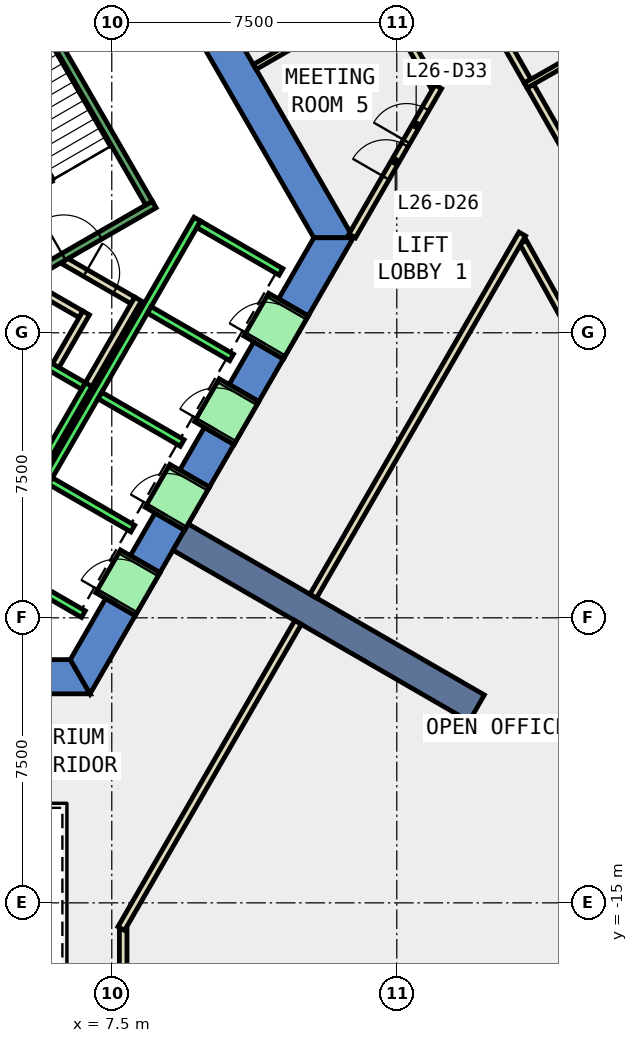
"""IFC4 building model, lengths in metres.
Left out: names, types, materials, properties, quantities, classifications, styles, units other than length and angle.
Written with IfcOpenShell. Run it as: python <this file> out.ifc"""

import sys

from ifc_helpers import new_model, si_unit, direction, frame, frame_2d, origin, place, context, subcontext, project, spatial, polyline, rectangle, outline, extrude, element, fill, save


model = new_model("IFC4")
c1 = context("Model", 3, precision=1e-05, world=origin(), true_north=direction((0.0, 1.0)))
c2 = subcontext(c1, "Body", "Model", "MODEL_VIEW")
j1 = project(units=[si_unit("LENGTHUNIT", "METRE"), si_unit("PLANEANGLEUNIT", "RADIAN")], contexts=[c1])
p1 = place(None, origin())
s1 = spatial("IfcSite", under=j1, at=p1, CompositionType="ELEMENT")
p2 = place(p1, origin())
s2 = spatial("IfcBuilding", under=s1, at=p2, CompositionType="ELEMENT")
p3 = place(p2, frame((0.0, 0.0, 120.2)))
s3 = spatial("IfcBuildingStorey", under=s2, at=p3, CompositionType="ELEMENT", Elevation=120.2)
p4 = place(p3, frame((0.0, 0.0, -0.4)))
e1 = element("IfcWall", 1, at=p4, inside=s3, PredefinedType="SHEAR", context=c2, shape_type="SweptSolid", body=[
    extrude(outline(polyline([(8.517, 11.748), (7.738, 11.298), (12.817, 2.5), (13.856, 2.5), (8.517, 11.748)])), origin(), (0.0, 0.0, 1.0), 4.2),
])
p5 = place(p3, frame((0.0, 0.0, -0.4)))
e2 = element("IfcWall", 2, at=p5, inside=s3, PredefinedType="SHEAR", context=c2, shape_type="SweptSolid", body=[
    extrude(outline(polyline([(5.75, -8.6), (5.75, -9.5), (6.928, -9.5), (6.409, -8.6), (5.75, -8.6)])), origin(), (0.0, 0.0, 1.0), 4.2),
])
p6 = place(p3, frame((0.0, 0.0, -0.4)))
e3 = element("IfcWall", 3, at=p6, inside=s3, PredefinedType="SHEAR", context=c2, shape_type="SweptSolid", body=[
    extrude(outline(polyline([(8.117, -7.44), (7.338, -6.99), (6.409, -8.6), (6.928, -9.5), (8.117, -7.44)])), origin(), (0.0, 0.0, 1.0), 4.2),
])
p7 = place(p3, frame((0.0, 0.0, -0.4)))
e4 = element("IfcWall", 4, at=p7, inside=s3, PredefinedType="SHEAR", context=c2, shape_type="SweptSolid", body=[
    extrude(outline(polyline([(9.417, -5.189), (8.638, -4.739), (7.988, -5.864), (8.767, -6.314), (9.417, -5.189)])), origin(), (0.0, 0.0, 1.0), 4.2),
])
p8 = place(p3, frame((0.0, 0.0, -0.4)))
e5 = element("IfcWall", 5, at=p8, inside=s3, PredefinedType="SHEAR", context=c2, shape_type="SweptSolid", body=[
    extrude(outline(polyline([(10.717, -2.937), (9.938, -2.487), (9.288, -3.613), (10.067, -4.063), (10.717, -2.937)])), origin(), (0.0, 0.0, 1.0), 4.2),
])
p9 = place(p3, frame((0.0, 0.0, -0.4)))
e6 = element("IfcWall", 6, at=p9, inside=s3, PredefinedType="SHEAR", context=c2, shape_type="SweptSolid", body=[
    extrude(outline(polyline([(12.017, -0.686), (11.238, -0.236), (10.588, -1.361), (11.367, -1.811), (12.017, -0.686)])), origin(), (0.0, 0.0, 1.0), 4.2),
])
p10 = place(p3, frame((0.0, 0.0, -0.4)))
e7 = element("IfcWall", 7, at=p10, inside=s3, PredefinedType="SHEAR", context=c2, shape_type="SweptSolid", body=[
    extrude(outline(polyline([(11.888, 0.89), (12.667, 0.44), (13.856, 2.5), (12.817, 2.5), (11.888, 0.89)])), origin(), (0.0, 0.0, 1.0), 4.2),
])
p11 = place(p3, frame((0.0, 0.0, 3.6)))
e8 = element("IfcWall", 8, at=p11, inside=s3, PredefinedType="SHEAR", context=c2, shape_type="SweptSolid", body=[
    extrude(outline(polyline([(8.767, -6.314), (7.988, -5.864), (7.338, -6.99), (8.117, -7.44), (8.767, -6.314)])), origin(), (0.0, 0.0, 1.0), 0.2),
])
p12 = place(p3, frame((0.0, 0.0, 3.6)))
e9 = element("IfcWall", 9, at=p12, inside=s3, PredefinedType="SHEAR", context=c2, shape_type="SweptSolid", body=[
    extrude(outline(polyline([(10.067, -4.063), (9.288, -3.613), (8.638, -4.739), (9.417, -5.189), (10.067, -4.063)])), origin(), (0.0, 0.0, 1.0), 0.2),
])
p13 = place(p3, frame((0.0, 0.0, 3.6)))
e10 = element("IfcWall", 10, at=p13, inside=s3, PredefinedType="SHEAR", context=c2, shape_type="SweptSolid", body=[
    extrude(outline(polyline([(11.367, -1.811), (10.588, -1.361), (9.938, -2.487), (10.717, -2.937), (11.367, -1.811)])), origin(), (0.0, 0.0, 1.0), 0.2),
])
p14 = place(p3, frame((0.0, 0.0, 3.6)))
e11 = element("IfcWall", 11, at=p14, inside=s3, PredefinedType="SHEAR", context=c2, shape_type="SweptSolid", body=[
    extrude(outline(polyline([(12.667, 0.44), (11.888, 0.89), (11.238, -0.236), (12.017, -0.686), (12.667, 0.44)])), origin(), (0.0, 0.0, 1.0), 0.2),
])
p15 = place(p3, frame((9.31, -5.375, -0.4), z_axis=(0.0, 0.0, 1.0), x_axis=(0.866017533419, -0.500013631625, 0.0)))
e12 = element("IfcWall", 12, at=p15, inside=s3, PredefinedType="SHEAR", context=c2, shape_type="SweptSolid", body=[
    extrude(rectangle(XDim=9.0, YDim=0.8, at=frame_2d((4.5, 0.0))), origin(), (0.0, 0.0, 1.0), 4.2),
])
p16 = place(p3, frame((15.993, 6.473, 0.0), z_axis=(0.0, 0.0, 1.0), x_axis=(-0.495159881733, 0.86880187127, 0.0)))
e13 = element("IfcWall", 13, at=p16, inside=s3, PredefinedType="PARTITIONING", context=c2, shape_type="SweptSolid", body=[
    extrude(rectangle(XDim=2.391, YDim=0.2, at=frame_2d((1.195, 0.0))), origin(), (0.0, 0.0, 1.0), 3.8),
])
p17 = place(p3, frame((21.773, -3.822, 0.0), z_axis=(0.0, 0.0, 1.0), x_axis=(-0.485826874234, 0.874055060206, 0.0)))
e14 = element("IfcWall", 14, at=p17, inside=s3, PredefinedType="PARTITIONING", context=c2, shape_type="SweptSolid", body=[
    extrude(rectangle(XDim=7.099, YDim=0.2, at=frame_2d((3.55, 0.0))), origin(), (0.0, 0.0, 1.0), 3.8),
])
p18 = place(p3, frame((18.515, 6.491, 0.0), z_axis=(0.0, 0.0, 1.0), x_axis=(0.495309264725, -0.868716715781, 0.0)))
e15 = element("IfcWall", 15, at=p18, inside=s3, PredefinedType="PARTITIONING", context=c2, shape_type="SweptSolid", body=[
    extrude(rectangle(XDim=3.487, YDim=0.2, at=frame_2d((1.743, 0.0))), origin(), (0.0, 0.0, 1.0), 3.8),
])
p19 = place(p3, frame((16.714, 9.65, 0.0), z_axis=(0.0, 0.0, 1.0), x_axis=(0.495286549488, -0.868729666753, 0.0)))
e16 = element("IfcWall", 16, at=p19, inside=s3, PredefinedType="PARTITIONING", context=c2, shape_type="SweptSolid", body=[
    extrude(rectangle(XDim=3.487, YDim=0.2, at=frame_2d((1.743, 0.0))), origin(), (0.0, 0.0, 1.0), 3.8),
])
p20 = place(p3, frame((5.499, 1.172, 0.0), z_axis=(0.0, 0.0, 1.0), x_axis=(0.866333505267, -0.499465972466, 0.0)))
e17 = element("IfcWall", 17, at=p20, inside=s3, PredefinedType="PARTITIONING", context=c2, shape_type="SweptSolid", body=[
    extrude(rectangle(XDim=1.374, YDim=0.2, at=frame_2d((0.687, 0.0))), origin(), (0.0, 0.0, 1.0), 3.8),
])
p21 = place(p3, frame((6.826, 0.522, 0.0), z_axis=(0.0, 0.0, 1.0), x_axis=(-0.500016722714, -0.866015748706, 0.0)))
e18 = element("IfcWall", 18, at=p21, inside=s3, PredefinedType="PARTITIONING", context=c2, shape_type="SweptSolid", body=[
    extrude(rectangle(XDim=1.7, YDim=0.2, at=frame_2d((0.85, 0.0))), origin(), (0.0, 0.0, 1.0), 3.8),
])
p22 = place(p3, frame((6.25, 1.894, 0.0), z_axis=(0.0, 0.0, 1.0), x_axis=(0.866043184279, -0.499969202016, 0.0)))
e19 = element("IfcWall", 19, at=p22, inside=s3, PredefinedType="PARTITIONING", context=c2, shape_type="SweptSolid", body=[
    extrude(rectangle(XDim=2.084, YDim=0.2, at=frame_2d((1.042, 0.0))), origin(), (0.0, 0.0, 1.0), 3.8),
])
p23 = place(p22, frame((0.642, 0.0, 0.0)))
e20 = element("IfcOpeningElement", 20, at=p23, cuts=e19, PredefinedType="OPENING", context=c2, shape_type="SweptSolid", body=[
    extrude(rectangle(XDim=0.9, YDim=2.1, at=frame_2d((0.45, 1.05))), frame((0.0, 0.11, 0.0), z_axis=(0.0, -1.0, 0.0), x_axis=(1.0, 0.0, 0.0)), (0.0, 0.0, 1.0), 0.22),
])
p24 = place(p3, frame((8.192, 0.888, 0.0), z_axis=(0.0, 0.0, 1.0), x_axis=(-0.499940625693, -0.866059680843, 0.0)))
e21 = element("IfcWall", 21, at=p24, inside=s3, PredefinedType="PARTITIONING", context=c2, shape_type="SweptSolid", body=[
    extrude(rectangle(XDim=2.68, YDim=0.2, at=frame_2d((1.34, 0.0))), origin(), (0.0, 0.0, 1.0), 3.8),
])
p25 = place(p3, frame((11.261, 6.994, 0.0), z_axis=(0.0, 0.0, 1.0), x_axis=(0.86605248387, 0.499953092981, 0.0)))
e22 = element("IfcWall", 22, at=p25, inside=s3, PredefinedType="PARTITIONING", context=c2, shape_type="SweptSolid", body=[
    extrude(rectangle(XDim=3.848, YDim=0.15, at=frame_2d((1.924, 0.0))), origin(), (0.0, 0.0, 1.0), 3.8),
])
p26 = place(p3, frame((13.827, 2.55, 0.0), z_axis=(0.0, 0.0, 1.0), x_axis=(0.500045913515, 0.865998893981, 0.0)))
e23 = element("IfcWall", 23, at=p26, inside=s3, PredefinedType="PARTITIONING", context=c2, shape_type="SweptSolid", body=[
    extrude(rectangle(XDim=4.53, YDim=0.2, at=frame_2d((2.265, 0.0))), origin(), (0.0, 0.0, 1.0), 3.8),
])
p27 = place(p26, frame((1.765, 0.0, 0.0)))
e24 = element("IfcOpeningElement", 24, at=p27, cuts=e23, PredefinedType="OPENING", context=c2, shape_type="SweptSolid", body=[
    extrude(rectangle(XDim=1.0, YDim=2.1, at=frame_2d((0.5, 1.05))), frame((0.0, 0.11, 0.0), z_axis=(0.0, -1.0, 0.0), x_axis=(1.0, 0.0, 0.0)), (0.0, 0.0, 1.0), 0.22),
])
p28 = place(p26, frame((2.865, 0.0, 0.0)))
e25 = element("IfcOpeningElement", 25, at=p28, cuts=e23, PredefinedType="OPENING", context=c2, shape_type="SweptSolid", body=[
    extrude(rectangle(XDim=1.0, YDim=2.1, at=frame_2d((0.5, 1.05))), frame((0.0, 0.11, 0.0), z_axis=(0.0, -1.0, 0.0), x_axis=(1.0, 0.0, 0.0)), (0.0, 0.0, 1.0), 0.22),
])
p29 = place(p3, frame((7.8, -15.69, 0.0), z_axis=(0.0, 0.0, 1.0), x_axis=(0.0, -1.0, 0.0)))
e26 = element("IfcWall", 26, at=p29, inside=s3, PredefinedType="PARTITIONING", context=c2, shape_type="SweptSolid", body=[
    extrude(rectangle(XDim=1.608, YDim=0.2, at=frame_2d((0.804, 0.0))), origin(), (0.0, 0.0, 1.0), 3.8),
])
p30 = place(p3, frame((18.301, 2.598, 0.0), z_axis=(0.0, 0.0, 1.0), x_axis=(-0.49997732567, -0.866038494419, 0.0)))
e27 = element("IfcWall", 27, at=p30, inside=s3, PredefinedType="PARTITIONING", context=c2, shape_type="SweptSolid", body=[
    extrude(rectangle(XDim=11.0, YDim=0.2, at=frame_2d((5.5, 0.0))), origin(), (0.0, 0.0, 1.0), 3.8),
])
p31 = place(p3, frame((18.391, 6.506, 0.0), z_axis=(0.0, 0.0, 1.0), x_axis=(0.868738258528, 0.495271479261, 0.0)))
e28 = element("IfcWall", 28, at=p31, inside=s3, PredefinedType="PARTITIONING", context=c2, shape_type="SweptSolid", body=[
    extrude(rectangle(XDim=7.701, YDim=0.15, at=frame_2d((3.85, 0.0))), origin(), (0.0, 0.0, 1.0), 3.8),
])
p32 = place(p3, frame((12.401, -7.621, 0.0), z_axis=(0.0, 0.0, 1.0), x_axis=(-0.499983724212, -0.866034800411, 0.0)))
e29 = element("IfcWall", 29, at=p32, inside=s3, PredefinedType="PARTITIONING", context=c2, shape_type="SweptSolid", body=[
    extrude(rectangle(XDim=9.302, YDim=0.2, at=frame_2d((4.651, 0.0))), origin(), (0.0, 0.0, 1.0), 3.8),
])
p33 = place(p3, frame((5.492, -3.788, 0.0), z_axis=(0.0, 0.0, 1.0), x_axis=(0.500011755427, 0.866018616679, 0.0)))
e30 = element("IfcWall", 30, at=p33, inside=s3, PredefinedType="STANDARD", context=c2, shape_type="SweptSolid", body=[
    extrude(rectangle(XDim=2.8, YDim=0.2, at=frame_2d((1.4, 0.0))), origin(), (0.0, 0.0, 1.0), 3.8),
])
p34 = place(p3, frame((4.677, -0.2, 0.0), z_axis=(0.0, 0.0, 1.0), x_axis=(0.865973769406, -0.500089422704, 0.0)))
e31 = element("IfcWall", 31, at=p34, inside=s3, PredefinedType="STANDARD", context=c2, shape_type="SweptSolid", body=[
    extrude(rectangle(XDim=2.399, YDim=0.2, at=frame_2d((1.2, 0.0))), origin(), (0.0, 0.0, 1.0), 3.8),
])
p35 = place(p3, frame((4.451, -6.19, 0.0), z_axis=(0.0, 0.0, 1.0), x_axis=(0.50000090737, 0.866024879913, 0.0)))
e32 = element("IfcWall", 32, at=p35, inside=s3, PredefinedType="STANDARD", context=c2, shape_type="SweptSolid", body=[
    extrude(rectangle(XDim=10.6, YDim=0.2, at=frame_2d((5.3, 0.0))), origin(), (0.0, 0.0, 1.0), 3.8),
])
for number, where, z_axis, x_axis in (
    (33, (4.588, -6.153, 0.0), (0.0, 0.0, 1.0), (0.866, -0.5, 0.0)),
    (34, (5.888, -3.902, 0.0), (0.0, 0.0, 1.0), (0.866, -0.5, 0.0)),
    (35, (7.188, -1.65, 0.0), (0.0, 0.0, 1.0), (0.866, -0.5, 0.0)),
    (36, (8.488, 0.602, 0.0), (0.0, 0.0, 1.0), (0.866, -0.5, 0.0)),
):
    element("IfcWall", number, at=place(p3, frame(where, z_axis=z_axis, x_axis=x_axis)), inside=s3, PredefinedType="STANDARD", context=c2, shape_type="SweptSolid", body=[
        extrude(rectangle(XDim=2.5, YDim=0.2, at=frame_2d((1.25, 0.0))), origin(), (0.0, 0.0, 1.0), 3.8),
    ])
p36 = place(p3, frame((9.788, 2.853, 0.0), z_axis=(0.0, 0.0, 1.0), x_axis=(0.865998541277, -0.500046524342, 0.0)))
e37 = element("IfcWall", 37, at=p36, inside=s3, PredefinedType="STANDARD", context=c2, shape_type="SweptSolid", body=[
    extrude(rectangle(XDim=2.5, YDim=0.2, at=frame_2d((1.25, 0.0))), origin(), (0.0, 0.0, 1.0), 3.8),
])
p37 = place(p3, frame((7.598, -7.14, 0.0), z_axis=(0.0, 0.0, 1.0), x_axis=(0.500362116554, 0.865816234728, 0.0)))
e38 = element("IfcWall", 38, at=p37, inside=s3, PredefinedType="STANDARD", context=c2, shape_type="SweptSolid", body=[
    extrude(rectangle(XDim=1.299, YDim=1.2, at=frame_2d((0.65, 0.0))), origin(), (0.0, 0.0, 1.0), 2.4),
])
p38 = place(p37, frame((0.1, 0.0, 0.0)))
e39 = element("IfcOpeningElement", 39, at=p38, cuts=e38, PredefinedType="OPENING", context=c2, shape_type="SweptSolid", body=[
    extrude(rectangle(XDim=1.1, YDim=2.3, at=frame_2d((0.55, 1.15))), frame((0.0, 0.61, 0.0), z_axis=(0.0, -1.0, 0.0), x_axis=(1.0, 0.0, 0.0)), (0.0, 0.0, 1.0), 1.22),
])
p39 = place(p3, frame((8.898, -4.889, 0.0), z_axis=(0.0, 0.0, 1.0), x_axis=(0.500036693733, 0.866004217611, 0.0)))
e40 = element("IfcWall", 40, at=p39, inside=s3, PredefinedType="STANDARD", context=c2, shape_type="SweptSolid", body=[
    extrude(rectangle(XDim=1.3, YDim=1.2, at=frame_2d((0.65, 0.0))), origin(), (0.0, 0.0, 1.0), 2.4),
])
p40 = place(p39, frame((0.1, 0.0, 0.0)))
e41 = element("IfcOpeningElement", 41, at=p40, cuts=e40, PredefinedType="OPENING", context=c2, shape_type="SweptSolid", body=[
    extrude(rectangle(XDim=1.1, YDim=2.3, at=frame_2d((0.55, 1.15))), frame((0.0, 0.61, 0.0), z_axis=(0.0, -1.0, 0.0), x_axis=(1.0, 0.0, 0.0)), (0.0, 0.0, 1.0), 1.22),
])
p41 = place(p3, frame((10.198, -2.637, 0.0), z_axis=(0.0, 0.0, 1.0), x_axis=(0.49989585183, 0.866085525409, 0.0)))
e42 = element("IfcWall", 42, at=p41, inside=s3, PredefinedType="STANDARD", context=c2, shape_type="SweptSolid", body=[
    extrude(rectangle(XDim=1.3, YDim=1.2, at=frame_2d((0.65, 0.0))), origin(), (0.0, 0.0, 1.0), 2.4),
])
p42 = place(p41, frame((0.1, 0.0, 0.0)))
e43 = element("IfcOpeningElement", 43, at=p42, cuts=e42, PredefinedType="OPENING", context=c2, shape_type="SweptSolid", body=[
    extrude(rectangle(XDim=1.1, YDim=2.3, at=frame_2d((0.55, 1.15))), frame((0.0, 0.61, 0.0), z_axis=(0.0, -1.0, 0.0), x_axis=(1.0, 0.0, 0.0)), (0.0, 0.0, 1.0), 1.22),
])
p43 = place(p3, frame((11.498, -0.385, 0.0), z_axis=(0.0, 0.0, 1.0), x_axis=(0.500221244143, 0.865897630733, 0.0)))
e44 = element("IfcWall", 44, at=p43, inside=s3, PredefinedType="STANDARD", context=c2, shape_type="SweptSolid", body=[
    extrude(rectangle(XDim=1.299, YDim=1.2, at=frame_2d((0.65, 0.0))), origin(), (0.0, 0.0, 1.0), 2.4),
])
p44 = place(p43, frame((0.1, 0.0, 0.0)))
e45 = element("IfcOpeningElement", 45, at=p44, cuts=e44, PredefinedType="OPENING", context=c2, shape_type="SweptSolid", body=[
    extrude(rectangle(XDim=1.1, YDim=2.3, at=frame_2d((0.55, 1.15))), frame((0.0, 0.61, 0.0), z_axis=(0.0, -1.0, 0.0), x_axis=(1.0, 0.0, 0.0)), (0.0, 0.0, 1.0), 1.22),
])
p45 = place(p3, frame((4.806, 1.176, 0.0), z_axis=(0.0, 0.0, 1.0), x_axis=(0.866059941101, 0.499940174841, 0.0)))
e46 = element("IfcWall", 46, at=p45, inside=s3, PredefinedType="STANDARD", context=c2, shape_type="SweptSolid", body=[
    extrude(rectangle(XDim=4.4, YDim=0.2, at=frame_2d((2.2, 0.0))), origin(), (0.0, 0.0, 1.0), 3.8),
])
p46 = place(p45, frame((1.65, 0.0, 0.0)))
e47 = element("IfcOpeningElement", 47, at=p46, cuts=e46, PredefinedType="OPENING", context=c2, shape_type="SweptSolid", body=[
    extrude(rectangle(XDim=1.1, YDim=2.2, at=frame_2d((0.55, 1.1))), frame((0.0, 0.11, 0.0), z_axis=(0.0, -1.0, 0.0), x_axis=(1.0, 0.0, 0.0)), (0.0, 0.0, 1.0), 0.22),
])
p47 = place(p3, frame((8.48, 3.412, 0.0), z_axis=(0.0, 0.0, 1.0), x_axis=(-0.499978703459, 0.866037698999, 0.0)))
e48 = element("IfcWall", 48, at=p47, inside=s3, PredefinedType="STANDARD", context=c2, shape_type="SweptSolid", body=[
    extrude(rectangle(XDim=6.9, YDim=0.2, at=frame_2d((3.45, 0.0))), origin(), (0.0, 0.0, 1.0), 3.8),
])
p48 = place(p27, origin())
e49 = element("IfcDoor", 49, at=p48, inside=s3, OperationType="SINGLE_SWING_LEFT", PredefinedType="DOOR", context=c2, shape_type="SweptSolid", body=[
    extrude(rectangle(XDim=1.0, YDim=2.1, at=frame_2d((0.5, 1.05))), frame((0.0, 0.025, 0.0), z_axis=(0.0, -1.0, 0.0), x_axis=(1.0, 0.0, 0.0)), (0.0, 0.0, 1.0), 0.05),
])
fill(e24, e49)
p49 = place(p23, origin())
e50 = element("IfcDoor", 50, at=p49, inside=s3, OperationType="SINGLE_SWING_LEFT", PredefinedType="DOOR", context=c2, shape_type="SweptSolid", body=[
    extrude(rectangle(XDim=0.9, YDim=2.1, at=frame_2d((0.45, 1.05))), frame((0.0, 0.025, 0.0), z_axis=(0.0, -1.0, 0.0), x_axis=(1.0, 0.0, 0.0)), (0.0, 0.0, 1.0), 0.05),
])
fill(e20, e50)
p50 = place(p28, origin())
e51 = element("IfcDoor", 51, at=p50, inside=s3, OperationType="SINGLE_SWING_RIGHT", PredefinedType="DOOR", context=c2, shape_type="SweptSolid", body=[
    extrude(rectangle(XDim=1.0, YDim=2.1, at=frame_2d((0.5, 1.05))), frame((0.0, 0.025, 0.0), z_axis=(0.0, -1.0, 0.0), x_axis=(1.0, 0.0, 0.0)), (0.0, 0.0, 1.0), 0.05),
])
fill(e25, e51)
p51 = place(p38, origin())
e52 = element("IfcDoor", 52, at=p51, inside=s3, OperationType="SLIDING_TO_LEFT", PredefinedType="DOOR", context=c2, shape_type="SweptSolid", body=[
    extrude(rectangle(XDim=1.1, YDim=2.3, at=frame_2d((0.55, 1.15))), frame((0.0, 0.025, 0.0), z_axis=(0.0, -1.0, 0.0), x_axis=(1.0, 0.0, 0.0)), (0.0, 0.0, 1.0), 0.05),
])
fill(e39, e52)
p52 = place(p40, origin())
e53 = element("IfcDoor", 53, at=p52, inside=s3, OperationType="SLIDING_TO_LEFT", PredefinedType="DOOR", context=c2, shape_type="SweptSolid", body=[
    extrude(rectangle(XDim=1.1, YDim=2.3, at=frame_2d((0.55, 1.15))), frame((0.0, 0.025, 0.0), z_axis=(0.0, -1.0, 0.0), x_axis=(1.0, 0.0, 0.0)), (0.0, 0.0, 1.0), 0.05),
])
fill(e41, e53)
p53 = place(p42, origin())
e54 = element("IfcDoor", 54, at=p53, inside=s3, OperationType="SLIDING_TO_LEFT", PredefinedType="DOOR", context=c2, shape_type="SweptSolid", body=[
    extrude(rectangle(XDim=1.1, YDim=2.3, at=frame_2d((0.55, 1.15))), frame((0.0, 0.025, 0.0), z_axis=(0.0, -1.0, 0.0), x_axis=(1.0, 0.0, 0.0)), (0.0, 0.0, 1.0), 0.05),
])
fill(e43, e54)
p54 = place(p44, origin())
e55 = element("IfcDoor", 55, at=p54, inside=s3, OperationType="SLIDING_TO_LEFT", PredefinedType="DOOR", context=c2, shape_type="SweptSolid", body=[
    extrude(rectangle(XDim=1.1, YDim=2.3, at=frame_2d((0.55, 1.15))), frame((0.0, 0.025, 0.0), z_axis=(0.0, -1.0, 0.0), x_axis=(1.0, 0.0, 0.0)), (0.0, 0.0, 1.0), 0.05),
])
fill(e45, e55)
p55 = place(p46, origin())
e56 = element("IfcDoor", 56, at=p55, inside=s3, OperationType="SINGLE_SWING_LEFT", PredefinedType="DOOR", context=c2, shape_type="SweptSolid", body=[
    extrude(rectangle(XDim=1.1, YDim=2.2, at=frame_2d((0.55, 1.1))), frame((0.0, 0.025, 0.0), z_axis=(0.0, -1.0, 0.0), x_axis=(1.0, 0.0, 0.0)), (0.0, 0.0, 1.0), 0.05),
])
fill(e47, e56)
save(model, sys.argv[1])
